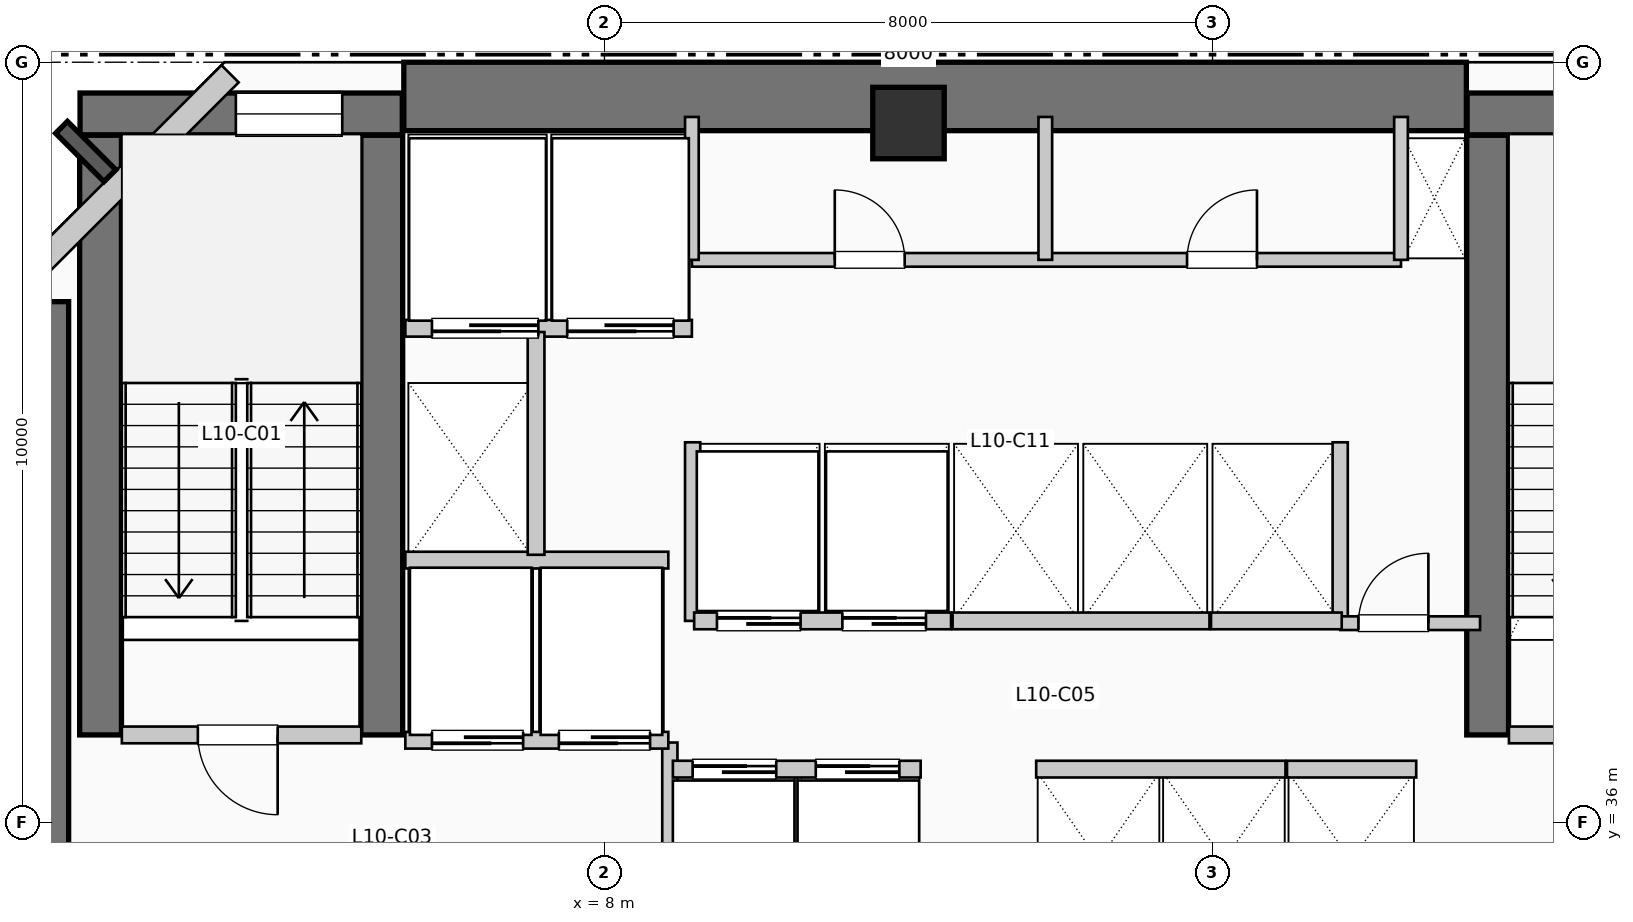
"""IFC4 building model, lengths in metres.
Left out: names, types, materials, properties, quantities, classifications, styles, units other than length and angle.
Written with IfcOpenShell. Run it as: python <this file> out.ifc"""

import sys

from ifc_helpers import new_model, si_unit, direction, frame, frame_2d, origin, origin_2d, place, context, subcontext, project, spatial, rectangle, extrude, element, fill, save


model = new_model("IFC4")
c1 = context("Model", 3, precision=1e-05, world=origin(), true_north=direction((0.0, 1.0)))
c2 = subcontext(c1, "Body", "Model", "MODEL_VIEW")
j1 = project(units=[si_unit("LENGTHUNIT", "METRE"), si_unit("PLANEANGLEUNIT", "RADIAN")], contexts=[c1])
p1 = place(None, origin())
s1 = spatial("IfcSite", under=j1, at=p1, CompositionType="ELEMENT")
p2 = place(p1, origin())
s2 = spatial("IfcBuilding", under=s1, at=p2, CompositionType="ELEMENT")
p3 = place(p2, frame((0.0, 0.0, 46.2)))
s3 = spatial("IfcBuildingStorey", under=s2, at=p3, CompositionType="ELEMENT", Elevation=46.2)
p4 = place(p3, frame((5.36, 45.55, 0.0), z_axis=(0.0, 0.0, 1.0), x_axis=(1.0, 0.0, 0.0)))
e1 = element("IfcWall", 1, at=p4, inside=s3, PredefinedType="SHEAR", context=c2, shape_type="SweptSolid", body=[
    extrude(rectangle(XDim=13.98, YDim=0.9, at=frame_2d((6.99, 0.0))), origin(), (0.0, 0.0, 1.0), 3.96),
])
p5 = place(p3, frame((0.5, 34.95, 0.0), z_axis=(0.0, 0.0, 1.0), x_axis=(0.0, 1.0, 0.0)))
e2 = element("IfcWall", 2, at=p5, inside=s3, PredefinedType="SHEAR", context=c2, shape_type="SweptSolid", body=[
    extrude(rectangle(XDim=7.9, YDim=0.9, at=frame_2d((3.95, 0.0))), origin(), (0.0, 0.0, 1.0), 3.96),
])
for number, where, z_axis, x_axis in (
    (3, (1.37, 37.15, 0.0), (0.0, 0.0, 1.0), (0.0, 1.0, 0.0)),
    (4, (5.07, 37.15, 0.0), (0.0, 0.0, 1.0), (0.0, 1.0, 0.0)),
):
    element("IfcWall", number, at=place(p3, frame(where, z_axis=z_axis, x_axis=x_axis)), inside=s3, PredefinedType="SHEAR", context=c2, shape_type="SweptSolid", body=[
        extrude(rectangle(XDim=7.89, YDim=0.55, at=frame_2d((3.945, 0.0))), origin(), (0.0, 0.0, 1.0), 3.96),
    ])
p6 = place(p3, frame((1.1, 45.32, 0.0), z_axis=(0.0, 0.0, 1.0), x_axis=(1.0, 0.0, 0.0)))
e5 = element("IfcWall", 5, at=p6, inside=s3, PredefinedType="SHEAR", context=c2, shape_type="SweptSolid", body=[
    extrude(rectangle(XDim=4.24, YDim=0.55, at=frame_2d((2.12, 0.0))), origin(), (0.0, 0.0, 1.0), 3.96),
])
p7 = place(p6, frame((2.05, 0.0, 1.05)))
e6 = element("IfcOpeningElement", 6, at=p7, cuts=e5, PredefinedType="OPENING", context=c2, shape_type="SweptSolid", body=[
    extrude(rectangle(XDim=1.4, YDim=1.8, at=frame_2d((0.7, 0.9))), frame((0.0, 0.285, 0.0), z_axis=(0.0, -1.0, 0.0), x_axis=(1.0, 0.0, 0.0)), (0.0, 0.0, 1.0), 0.57),
])
p8 = place(p3, frame((19.62, 37.15, 0.0), z_axis=(0.0, 0.0, 1.0), x_axis=(0.0, 1.0, 0.0)))
e7 = element("IfcWall", 7, at=p8, inside=s3, PredefinedType="SHEAR", context=c2, shape_type="SweptSolid", body=[
    extrude(rectangle(XDim=7.89, YDim=0.55, at=frame_2d((3.945, 0.0))), origin(), (0.0, 0.0, 1.0), 3.96),
])
p9 = place(p3, frame((19.35, 45.32, 0.0), z_axis=(0.0, 0.0, 1.0), x_axis=(1.0, 0.0, 0.0)))
e8 = element("IfcWall", 8, at=p9, inside=s3, PredefinedType="SHEAR", context=c2, shape_type="SweptSolid", body=[
    extrude(rectangle(XDim=3.69, YDim=0.55, at=frame_2d((1.845, 0.0))), origin(), (0.0, 0.0, 1.0), 3.96),
])
p10 = place(p9, frame((1.15, 0.0, 1.05)))
e9 = element("IfcOpeningElement", 9, at=p10, cuts=e8, PredefinedType="OPENING", context=c2, shape_type="SweptSolid", body=[
    extrude(rectangle(XDim=1.4, YDim=1.8, at=frame_2d((0.7, 0.9))), frame((0.0, 0.285, 0.0), z_axis=(0.0, -1.0, 0.0), x_axis=(1.0, 0.0, 0.0)), (0.0, 0.0, 1.0), 0.57),
])
p11 = place(p3, frame((12.0, 45.2, 0.0), z_axis=(0.0, 0.0, 1.0), x_axis=(1.0, 0.0, 0.0)))
e10 = element("IfcColumn", 10, at=p11, inside=s3, PredefinedType="COLUMN", context=c2, shape_type="SweptSolid", body=[
    extrude(rectangle(XDim=0.94, YDim=0.94, at=origin_2d()), origin(), (0.0, 0.0, 1.0), 3.96),
])
p12 = place(p3, frame((3.074, 45.848, 0.0), z_axis=(0.0, 0.0, 1.0), x_axis=(-0.707106781187, -0.707106781187, 0.0)))
e11 = element("IfcWall", 11, at=p12, inside=s3, PredefinedType="SOLIDWALL", context=c2, shape_type="SweptSolid", body=[
    extrude(rectangle(XDim=4.133, YDim=0.32, at=frame_2d((2.066, 0.0))), origin(), (0.0, 0.0, 1.0), 3.71),
])
p13 = place(p3, frame((1.65, 37.15, 0.0), z_axis=(0.0, 0.0, 1.0), x_axis=(1.0, 0.0, 0.0)))
e12 = element("IfcWall", 12, at=p13, inside=s3, PredefinedType="PARTITIONING", context=c2, shape_type="SweptSolid", body=[
    extrude(rectangle(XDim=3.15, YDim=0.22, at=frame_2d((1.575, 0.0))), origin(), (0.0, 0.0, 1.0), 3.71),
])
p14 = place(p13, frame((2.05, 0.0, 0.0), z_axis=(0.0, 0.0, 1.0), x_axis=(-1.0, 0.0, 0.0)))
e13 = element("IfcOpeningElement", 13, at=p14, cuts=e12, PredefinedType="OPENING", context=c2, shape_type="SweptSolid", body=[
    extrude(rectangle(XDim=1.05, YDim=2.15, at=frame_2d((0.525, 1.075))), frame((0.0, 0.12, 0.0), z_axis=(0.0, -1.0, 0.0), x_axis=(1.0, 0.0, 0.0)), (0.0, 0.0, 1.0), 0.24),
])
p15 = place(p3, frame((8.86, 34.55, 0.0), z_axis=(0.0, 0.0, 1.0), x_axis=(0.0, 1.0, 0.0)))
e14 = element("IfcWall", 14, at=p15, inside=s3, PredefinedType="PARTITIONING", context=c2, shape_type="SweptSolid", body=[
    extrude(rectangle(XDim=2.5, YDim=0.2, at=frame_2d((1.25, 0.0))), origin(), (0.0, 0.0, 1.0), 3.71),
])
p16 = place(p3, frame((19.9, 37.15, 0.0), z_axis=(0.0, 0.0, 1.0), x_axis=(1.0, 0.0, 0.0)))
e15 = element("IfcWall", 15, at=p16, inside=s3, PredefinedType="PARTITIONING", context=c2, shape_type="SweptSolid", body=[
    extrude(rectangle(XDim=3.15, YDim=0.22, at=frame_2d((1.575, 0.0))), origin(), (0.0, 0.0, 1.0), 3.71),
])
p17 = place(p16, frame((2.05, 0.0, 0.0), z_axis=(0.0, 0.0, 1.0), x_axis=(-1.0, 0.0, 0.0)))
e16 = element("IfcOpeningElement", 16, at=p17, cuts=e15, PredefinedType="OPENING", context=c2, shape_type="SweptSolid", body=[
    extrude(rectangle(XDim=1.05, YDim=2.15, at=frame_2d((0.525, 1.075))), frame((0.0, 0.12, 0.0), z_axis=(0.0, -1.0, 0.0), x_axis=(1.0, 0.0, 0.0)), (0.0, 0.0, 1.0), 0.24),
])
p18 = place(p3, frame((5.38, 37.08, 0.0), z_axis=(0.0, 0.0, 1.0), x_axis=(1.0, 0.0, 0.0)))
e17 = element("IfcWall", 17, at=p18, inside=s3, PredefinedType="PARTITIONING", context=c2, shape_type="SweptSolid", body=[
    extrude(rectangle(XDim=3.46, YDim=0.22, at=frame_2d((1.73, 0.0))), origin(), (0.0, 0.0, 1.0), 3.71),
])
p19 = place(p18, frame((1.55, 0.0, 0.0), z_axis=(0.0, 0.0, 1.0), x_axis=(-1.0, 0.0, 0.0)))
e18 = element("IfcOpeningElement", 18, at=p19, cuts=e17, PredefinedType="OPENING", context=c2, shape_type="SweptSolid", body=[
    extrude(rectangle(XDim=1.2, YDim=2.2, at=frame_2d((0.6, 1.1))), frame((0.0, 0.12, 0.0), z_axis=(0.0, -1.0, 0.0), x_axis=(1.0, 0.0, 0.0)), (0.0, 0.0, 1.0), 0.24),
])
p20 = place(p18, frame((3.22, 0.0, 0.0), z_axis=(0.0, 0.0, 1.0), x_axis=(-1.0, 0.0, 0.0)))
e19 = element("IfcOpeningElement", 19, at=p20, cuts=e17, PredefinedType="OPENING", context=c2, shape_type="SweptSolid", body=[
    extrude(rectangle(XDim=1.2, YDim=2.2, at=frame_2d((0.6, 1.1))), frame((0.0, 0.12, 0.0), z_axis=(0.0, -1.0, 0.0), x_axis=(1.0, 0.0, 0.0)), (0.0, 0.0, 1.0), 0.24),
])
p21 = place(p3, frame((5.38, 39.45, 0.0), z_axis=(0.0, 0.0, 1.0), x_axis=(1.0, 0.0, 0.0)))
e20 = element("IfcWall", 20, at=p21, inside=s3, PredefinedType="PARTITIONING", context=c2, shape_type="SweptSolid", body=[
    extrude(rectangle(XDim=3.46, YDim=0.22, at=frame_2d((1.73, 0.0))), origin(), (0.0, 0.0, 1.0), 3.71),
])
p22 = place(p3, frame((5.38, 42.5, 0.0), z_axis=(0.0, 0.0, 1.0), x_axis=(1.0, 0.0, 0.0)))
e21 = element("IfcWall", 21, at=p22, inside=s3, PredefinedType="PARTITIONING", context=c2, shape_type="SweptSolid", body=[
    extrude(rectangle(XDim=3.77, YDim=0.22, at=frame_2d((1.885, 0.0))), origin(), (0.0, 0.0, 1.0), 3.71),
])
p23 = place(p22, frame((1.75, 0.0, 0.0), z_axis=(0.0, 0.0, 1.0), x_axis=(-1.0, 0.0, 0.0)))
e22 = element("IfcOpeningElement", 22, at=p23, cuts=e21, PredefinedType="OPENING", context=c2, shape_type="SweptSolid", body=[
    extrude(rectangle(XDim=1.4, YDim=2.2, at=frame_2d((0.7, 1.1))), frame((0.0, 0.12, 0.0), z_axis=(0.0, -1.0, 0.0), x_axis=(1.0, 0.0, 0.0)), (0.0, 0.0, 1.0), 0.24),
])
p24 = place(p22, frame((3.53, 0.0, 0.0), z_axis=(0.0, 0.0, 1.0), x_axis=(-1.0, 0.0, 0.0)))
e23 = element("IfcOpeningElement", 23, at=p24, cuts=e21, PredefinedType="OPENING", context=c2, shape_type="SweptSolid", body=[
    extrude(rectangle(XDim=1.4, YDim=2.2, at=frame_2d((0.7, 1.1))), frame((0.0, 0.12, 0.0), z_axis=(0.0, -1.0, 0.0), x_axis=(1.0, 0.0, 0.0)), (0.0, 0.0, 1.0), 0.24),
])
p25 = place(p3, frame((7.1, 39.52, 0.0), z_axis=(0.0, 0.0, 1.0), x_axis=(0.0, 1.0, 0.0)))
e24 = element("IfcWall", 24, at=p25, inside=s3, PredefinedType="PARTITIONING", context=c2, shape_type="SweptSolid", body=[
    extrude(rectangle(XDim=2.93, YDim=0.22, at=frame_2d((1.465, 0.0))), origin(), (0.0, 0.0, 1.0), 3.71),
])
for number, where, z_axis, x_axis in (
    (25, (9.16, 38.65, 0.0), (0.0, 0.0, 1.0), (0.0, 1.0, 0.0)),
    (26, (17.68, 38.65, 0.0), (0.0, 0.0, 1.0), (0.0, 1.0, 0.0)),
):
    element("IfcWall", number, at=place(p3, frame(where, z_axis=z_axis, x_axis=x_axis)), inside=s3, PredefinedType="PARTITIONING", context=c2, shape_type="SweptSolid", body=[
        extrude(rectangle(XDim=2.35, YDim=0.2, at=frame_2d((1.175, 0.0))), origin(), (0.0, 0.0, 1.0), 3.71),
    ])
p26 = place(p3, frame((17.68, 38.62, 0.0), z_axis=(0.0, 0.0, 1.0), x_axis=(1.0, 0.0, 0.0)))
e27 = element("IfcWall", 27, at=p26, inside=s3, PredefinedType="PARTITIONING", context=c2, shape_type="SweptSolid", body=[
    extrude(rectangle(XDim=1.84, YDim=0.18, at=frame_2d((0.92, 0.0))), origin(), (0.0, 0.0, 1.0), 3.71),
])
p27 = place(p26, frame((0.24, 0.0, 0.0)))
e28 = element("IfcOpeningElement", 28, at=p27, cuts=e27, PredefinedType="OPENING", context=c2, shape_type="SweptSolid", body=[
    extrude(rectangle(XDim=0.92, YDim=2.1, at=frame_2d((0.46, 1.05))), frame((0.0, 0.1, 0.0), z_axis=(0.0, -1.0, 0.0), x_axis=(1.0, 0.0, 0.0)), (0.0, 0.0, 1.0), 0.2),
])
p28 = place(p3, frame((8.9, 36.7, 0.0), z_axis=(0.0, 0.0, 1.0), x_axis=(1.0, 0.0, 0.0)))
e29 = element("IfcWall", 29, at=p28, inside=s3, PredefinedType="PARTITIONING", context=c2, shape_type="SweptSolid", body=[
    extrude(rectangle(XDim=3.26, YDim=0.22, at=frame_2d((1.63, 0.0))), origin(), (0.0, 0.0, 1.0), 3.71),
])
p29 = place(p28, frame((0.26, 0.0, 0.0)))
e30 = element("IfcOpeningElement", 30, at=p29, cuts=e29, PredefinedType="OPENING", context=c2, shape_type="SweptSolid", body=[
    extrude(rectangle(XDim=1.1, YDim=2.2, at=frame_2d((0.55, 1.1))), frame((0.0, 0.12, 0.0), z_axis=(0.0, -1.0, 0.0), x_axis=(1.0, 0.0, 0.0)), (0.0, 0.0, 1.0), 0.24),
])
p30 = place(p28, frame((1.88, 0.0, 0.0)))
e31 = element("IfcOpeningElement", 31, at=p30, cuts=e29, PredefinedType="OPENING", context=c2, shape_type="SweptSolid", body=[
    extrude(rectangle(XDim=1.1, YDim=2.2, at=frame_2d((0.55, 1.1))), frame((0.0, 0.12, 0.0), z_axis=(0.0, -1.0, 0.0), x_axis=(1.0, 0.0, 0.0)), (0.0, 0.0, 1.0), 0.24),
])
p31 = place(p3, frame((9.18, 38.65, 0.0), z_axis=(0.0, 0.0, 1.0), x_axis=(1.0, 0.0, 0.0)))
e32 = element("IfcWall", 32, at=p31, inside=s3, PredefinedType="PARTITIONING", context=c2, shape_type="SweptSolid", body=[
    extrude(rectangle(XDim=3.38, YDim=0.22, at=frame_2d((1.69, 0.0))), origin(), (0.0, 0.0, 1.0), 3.71),
])
p32 = place(p31, frame((0.3, 0.0, 0.0)))
e33 = element("IfcOpeningElement", 33, at=p32, cuts=e32, PredefinedType="OPENING", context=c2, shape_type="SweptSolid", body=[
    extrude(rectangle(XDim=1.1, YDim=2.2, at=frame_2d((0.55, 1.1))), frame((0.0, 0.12, 0.0), z_axis=(0.0, -1.0, 0.0), x_axis=(1.0, 0.0, 0.0)), (0.0, 0.0, 1.0), 0.24),
])
p33 = place(p31, frame((1.95, 0.0, 0.0)))
e34 = element("IfcOpeningElement", 34, at=p33, cuts=e32, PredefinedType="OPENING", context=c2, shape_type="SweptSolid", body=[
    extrude(rectangle(XDim=1.1, YDim=2.2, at=frame_2d((0.55, 1.1))), frame((0.0, 0.12, 0.0), z_axis=(0.0, -1.0, 0.0), x_axis=(1.0, 0.0, 0.0)), (0.0, 0.0, 1.0), 0.24),
])
p34 = place(p3, frame((13.68, 36.7, 0.0), z_axis=(0.0, 0.0, 1.0), x_axis=(1.0, 0.0, 0.0)))
e35 = element("IfcWall", 35, at=p34, inside=s3, PredefinedType="PARTITIONING", context=c2, shape_type="SweptSolid", body=[
    extrude(rectangle(XDim=3.28, YDim=0.22, at=frame_2d((1.64, 0.0))), origin(), (0.0, 0.0, 1.0), 3.71),
])
p35 = place(p3, frame((12.58, 38.65, 0.0), z_axis=(0.0, 0.0, 1.0), x_axis=(1.0, 0.0, 0.0)))
e36 = element("IfcWall", 36, at=p35, inside=s3, PredefinedType="PARTITIONING", context=c2, shape_type="SweptSolid", body=[
    extrude(rectangle(XDim=3.38, YDim=0.22, at=frame_2d((1.69, 0.0))), origin(), (0.0, 0.0, 1.0), 3.71),
])
p36 = place(p3, frame((16.98, 36.7, 0.0), z_axis=(0.0, 0.0, 1.0), x_axis=(1.0, 0.0, 0.0)))
e37 = element("IfcWall", 37, at=p36, inside=s3, PredefinedType="PARTITIONING", context=c2, shape_type="SweptSolid", body=[
    extrude(rectangle(XDim=1.7, YDim=0.22, at=frame_2d((0.85, 0.0))), origin(), (0.0, 0.0, 1.0), 3.71),
])
p37 = place(p3, frame((15.98, 38.65, 0.0), z_axis=(0.0, 0.0, 1.0), x_axis=(1.0, 0.0, 0.0)))
e38 = element("IfcWall", 38, at=p37, inside=s3, PredefinedType="PARTITIONING", context=c2, shape_type="SweptSolid", body=[
    extrude(rectangle(XDim=1.72, YDim=0.22, at=frame_2d((0.86, 0.0))), origin(), (0.0, 0.0, 1.0), 3.71),
])
p38 = place(p3, frame((9.15, 43.4, 0.0), z_axis=(0.0, 0.0, 1.0), x_axis=(1.0, 0.0, 0.0)))
e39 = element("IfcWall", 39, at=p38, inside=s3, PredefinedType="PLUMBINGWALL", context=c2, shape_type="SweptSolid", body=[
    extrude(rectangle(XDim=9.33, YDim=0.18, at=frame_2d((4.665, 0.0))), origin(), (0.0, 0.0, 1.0), 3.71),
])
p39 = place(p38, frame((1.88, 0.0, 0.0)))
e40 = element("IfcOpeningElement", 40, at=p39, cuts=e39, PredefinedType="OPENING", context=c2, shape_type="SweptSolid", body=[
    extrude(rectangle(XDim=0.92, YDim=2.1, at=frame_2d((0.46, 1.05))), frame((0.0, 0.1, 0.0), z_axis=(0.0, -1.0, 0.0), x_axis=(1.0, 0.0, 0.0)), (0.0, 0.0, 1.0), 0.2),
])
p40 = place(p38, frame((6.515, 0.0, 0.0)))
e41 = element("IfcOpeningElement", 41, at=p40, cuts=e39, PredefinedType="OPENING", context=c2, shape_type="SweptSolid", body=[
    extrude(rectangle(XDim=0.92, YDim=2.1, at=frame_2d((0.46, 1.05))), frame((0.0, 0.1, 0.0), z_axis=(0.0, -1.0, 0.0), x_axis=(1.0, 0.0, 0.0)), (0.0, 0.0, 1.0), 0.2),
])
for number, where, z_axis, x_axis in (
    (42, (9.15, 43.4, 0.0), (0.0, 0.0, 1.0), (0.0, 1.0, 0.0)),
    (43, (18.48, 43.4, 0.0), (0.0, 0.0, 1.0), (0.0, 1.0, 0.0)),
    (44, (13.8, 43.4, 0.0), (0.0, 0.0, 1.0), (0.0, 1.0, 0.0)),
):
    element("IfcWall", number, at=place(p3, frame(where, z_axis=z_axis, x_axis=x_axis)), inside=s3, PredefinedType="PLUMBINGWALL", context=c2, shape_type="SweptSolid", body=[
        extrude(rectangle(XDim=1.88, YDim=0.18, at=frame_2d((0.94, 0.0))), origin(), (0.0, 0.0, 1.0), 3.71),
    ])
p41 = place(p7, origin())
e45 = element("IfcWindow", 45, at=p41, inside=s3, PartitioningType="SINGLE_PANEL", PredefinedType="WINDOW", context=c2, shape_type="SweptSolid", body=[
    extrude(rectangle(XDim=1.4, YDim=1.8, at=frame_2d((0.7, 0.9))), frame((0.0, 0.03, 0.0), z_axis=(0.0, -1.0, 0.0), x_axis=(1.0, 0.0, 0.0)), (0.0, 0.0, 1.0), 0.06),
])
fill(e6, e45)
p42 = place(p14, origin())
e46 = element("IfcDoor", 46, at=p42, inside=s3, OperationType="SINGLE_SWING_RIGHT", PredefinedType="DOOR", context=c2, shape_type="SweptSolid", body=[
    extrude(rectangle(XDim=1.05, YDim=2.15, at=frame_2d((0.525, 1.075))), frame((0.0, 0.025, 0.0), z_axis=(0.0, -1.0, 0.0), x_axis=(1.0, 0.0, 0.0)), (0.0, 0.0, 1.0), 0.05),
])
fill(e13, e46)
p43 = place(p19, origin())
e47 = element("IfcDoor", 47, at=p43, inside=s3, OperationType="SLIDING_TO_RIGHT", PredefinedType="DOOR", context=c2, shape_type="SweptSolid", body=[
    extrude(rectangle(XDim=1.2, YDim=2.2, at=frame_2d((0.6, 1.1))), frame((0.0, 0.025, 0.0), z_axis=(0.0, -1.0, 0.0), x_axis=(1.0, 0.0, 0.0)), (0.0, 0.0, 1.0), 0.05),
])
fill(e18, e47)
p44 = place(p20, origin())
e48 = element("IfcDoor", 48, at=p44, inside=s3, OperationType="SLIDING_TO_RIGHT", PredefinedType="DOOR", context=c2, shape_type="SweptSolid", body=[
    extrude(rectangle(XDim=1.2, YDim=2.2, at=frame_2d((0.6, 1.1))), frame((0.0, 0.025, 0.0), z_axis=(0.0, -1.0, 0.0), x_axis=(1.0, 0.0, 0.0)), (0.0, 0.0, 1.0), 0.05),
])
fill(e19, e48)
p45 = place(p23, origin())
e49 = element("IfcDoor", 49, at=p45, inside=s3, OperationType="SLIDING_TO_LEFT", PredefinedType="DOOR", context=c2, shape_type="SweptSolid", body=[
    extrude(rectangle(XDim=1.4, YDim=2.2, at=frame_2d((0.7, 1.1))), frame((0.0, 0.025, 0.0), z_axis=(0.0, -1.0, 0.0), x_axis=(1.0, 0.0, 0.0)), (0.0, 0.0, 1.0), 0.05),
])
fill(e22, e49)
p46 = place(p24, origin())
e50 = element("IfcDoor", 50, at=p46, inside=s3, OperationType="SLIDING_TO_LEFT", PredefinedType="DOOR", context=c2, shape_type="SweptSolid", body=[
    extrude(rectangle(XDim=1.4, YDim=2.2, at=frame_2d((0.7, 1.1))), frame((0.0, 0.025, 0.0), z_axis=(0.0, -1.0, 0.0), x_axis=(1.0, 0.0, 0.0)), (0.0, 0.0, 1.0), 0.05),
])
fill(e23, e50)
p47 = place(p27, origin())
e51 = element("IfcDoor", 51, at=p47, inside=s3, OperationType="SINGLE_SWING_RIGHT", PredefinedType="DOOR", context=c2, shape_type="SweptSolid", body=[
    extrude(rectangle(XDim=0.92, YDim=2.1, at=frame_2d((0.46, 1.05))), frame((0.0, 0.025, 0.0), z_axis=(0.0, -1.0, 0.0), x_axis=(1.0, 0.0, 0.0)), (0.0, 0.0, 1.0), 0.05),
])
fill(e28, e51)
p48 = place(p29, origin())
e52 = element("IfcDoor", 52, at=p48, inside=s3, OperationType="SLIDING_TO_LEFT", PredefinedType="DOOR", context=c2, shape_type="SweptSolid", body=[
    extrude(rectangle(XDim=1.1, YDim=2.2, at=frame_2d((0.55, 1.1))), frame((0.0, 0.025, 0.0), z_axis=(0.0, -1.0, 0.0), x_axis=(1.0, 0.0, 0.0)), (0.0, 0.0, 1.0), 0.05),
])
fill(e30, e52)
p49 = place(p30, origin())
e53 = element("IfcDoor", 53, at=p49, inside=s3, OperationType="SLIDING_TO_LEFT", PredefinedType="DOOR", context=c2, shape_type="SweptSolid", body=[
    extrude(rectangle(XDim=1.1, YDim=2.2, at=frame_2d((0.55, 1.1))), frame((0.0, 0.025, 0.0), z_axis=(0.0, -1.0, 0.0), x_axis=(1.0, 0.0, 0.0)), (0.0, 0.0, 1.0), 0.05),
])
fill(e31, e53)
p50 = place(p32, origin())
e54 = element("IfcDoor", 54, at=p50, inside=s3, OperationType="SLIDING_TO_LEFT", PredefinedType="DOOR", context=c2, shape_type="SweptSolid", body=[
    extrude(rectangle(XDim=1.1, YDim=2.2, at=frame_2d((0.55, 1.1))), frame((0.0, 0.025, 0.0), z_axis=(0.0, -1.0, 0.0), x_axis=(1.0, 0.0, 0.0)), (0.0, 0.0, 1.0), 0.05),
])
fill(e33, e54)
p51 = place(p33, origin())
e55 = element("IfcDoor", 55, at=p51, inside=s3, OperationType="SLIDING_TO_LEFT", PredefinedType="DOOR", context=c2, shape_type="SweptSolid", body=[
    extrude(rectangle(XDim=1.1, YDim=2.2, at=frame_2d((0.55, 1.1))), frame((0.0, 0.025, 0.0), z_axis=(0.0, -1.0, 0.0), x_axis=(1.0, 0.0, 0.0)), (0.0, 0.0, 1.0), 0.05),
])
fill(e34, e55)
p52 = place(p39, origin())
e56 = element("IfcDoor", 56, at=p52, inside=s3, OperationType="SINGLE_SWING_LEFT", PredefinedType="DOOR", context=c2, shape_type="SweptSolid", body=[
    extrude(rectangle(XDim=0.92, YDim=2.1, at=frame_2d((0.46, 1.05))), frame((0.0, 0.025, 0.0), z_axis=(0.0, -1.0, 0.0), x_axis=(1.0, 0.0, 0.0)), (0.0, 0.0, 1.0), 0.05),
])
fill(e40, e56)
p53 = place(p40, origin())
e57 = element("IfcDoor", 57, at=p53, inside=s3, OperationType="SINGLE_SWING_RIGHT", PredefinedType="DOOR", context=c2, shape_type="SweptSolid", body=[
    extrude(rectangle(XDim=0.92, YDim=2.1, at=frame_2d((0.46, 1.05))), frame((0.0, 0.025, 0.0), z_axis=(0.0, -1.0, 0.0), x_axis=(1.0, 0.0, 0.0)), (0.0, 0.0, 1.0), 0.05),
])
fill(e41, e57)
save(model, sys.argv[1])
